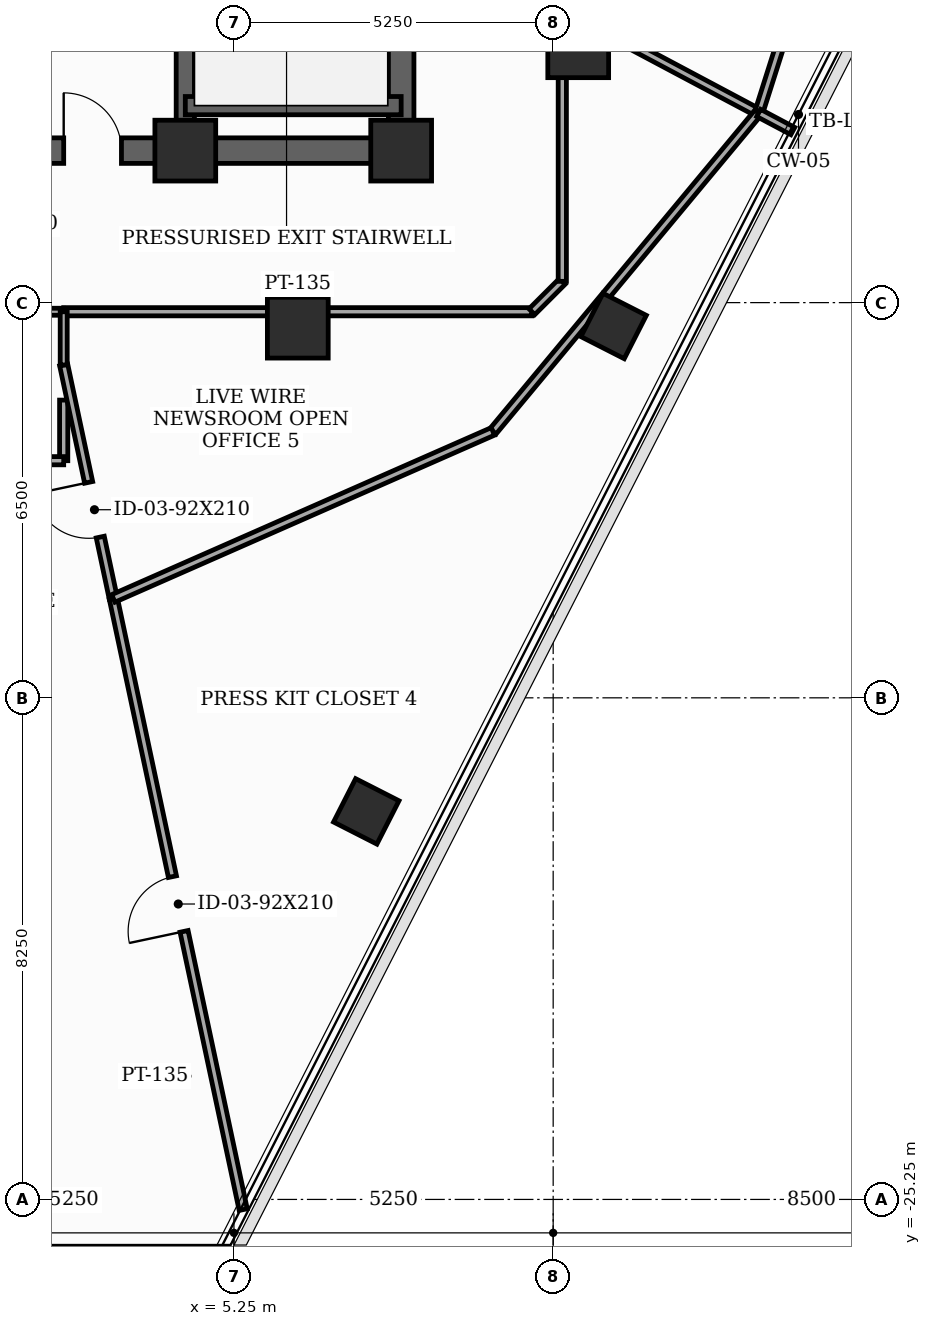
"""IFC4 building model, lengths in metres.
Left out: names, types, materials, properties, quantities, classifications, styles, units other than length and angle.
Written with IfcOpenShell. Run it as: python <this file> out.ifc"""

import sys

from ifc_helpers import new_model, si_unit, direction, frame, frame_2d, origin, origin_2d, place, context, subcontext, project, spatial, rectangle, extrude, element, fill, save


model = new_model("IFC4")
c1 = context("Model", 3, precision=1e-05, world=origin(), true_north=direction((0.0, 1.0)))
c2 = subcontext(c1, "Body", "Model", "MODEL_VIEW")
j1 = project(units=[si_unit("LENGTHUNIT", "METRE"), si_unit("PLANEANGLEUNIT", "RADIAN")], contexts=[c1])
p1 = place(None, origin())
s1 = spatial("IfcSite", under=j1, at=p1, CompositionType="ELEMENT")
p2 = place(p1, origin())
s2 = spatial("IfcBuilding", under=s1, at=p2, CompositionType="ELEMENT")
p3 = place(p2, frame((0.0, 0.0, 263.3)))
s3 = spatial("IfcBuildingStorey", under=s2, at=p3, CompositionType="ELEMENT", Elevation=263.3)
for number, where, z_axis, x_axis in (
    (1, (4.45, -8.0, 0.0), (0.0, 0.0, 1.0), (1.0, 0.0, 0.0)),
    (2, (8.0, -8.0, 0.0), (0.0, 0.0, 1.0), (1.0, 0.0, 0.0)),
    (3, (6.3, -10.912, 0.0), (0.0, 0.0, 1.0), (1.0, 0.0, 0.0)),
    (4, (10.912, -6.3, 0.0), (0.0, 0.0, 1.0), (1.0, 0.0, 0.0)),
):
    element("IfcColumn", number, at=place(p3, frame(where, z_axis=z_axis, x_axis=x_axis)), inside=s3, PredefinedType="COLUMN", context=c2, shape_type="SweptSolid", body=[
        extrude(rectangle(XDim=1.0, YDim=1.0, at=origin_2d()), origin(), (0.0, 0.0, 1.0), 3.7),
    ])
for number, where, z_axis, x_axis in (
    (5, (7.426, -18.868, 0.0), (0.0, 0.0, 1.0), (0.454, 0.891, 0.0)),
    (6, (11.494, -10.885, 0.0), (0.0, 0.0, 1.0), (0.454, 0.891, 0.0)),
):
    element("IfcColumn", number, at=place(p3, frame(where, z_axis=z_axis, x_axis=x_axis)), inside=s3, PredefinedType="COLUMN", context=c2, shape_type="SweptSolid", body=[
        extrude(rectangle(XDim=0.8, YDim=0.8, at=origin_2d()), origin(), (0.0, 0.0, 1.0), 3.7),
    ])
p4 = place(p3, frame((8.0, -8.0, 0.0), z_axis=(0.0, 0.0, 1.0), x_axis=(0.0, 1.0, 0.0)))
e7 = element("IfcWall", 7, at=p4, inside=s3, PredefinedType="SHEAR", context=c2, shape_type="SweptSolid", body=[
    extrude(rectangle(XDim=16.0, YDim=0.42, at=frame_2d((8.0, 0.0))), origin(), (0.0, 0.0, 1.0), 3.5),
])
p5 = place(p4, frame((9.6, 0.0, 0.0)))
e8 = element("IfcOpeningElement", 8, at=p5, cuts=e7, PredefinedType="OPENING", context=c2, shape_type="SweptSolid", body=[
    extrude(rectangle(XDim=1.05, YDim=2.15, at=frame_2d((0.525, 1.075))), frame((0.0, 0.22, 0.0), z_axis=(0.0, -1.0, 0.0), x_axis=(1.0, 0.0, 0.0)), (0.0, 0.0, 1.0), 0.44),
])
p6 = place(p4, frame((14.469, 0.0, 0.0)))
e9 = element("IfcOpeningElement", 9, at=p6, cuts=e7, PredefinedType="OPENING", context=c2, shape_type="SweptSolid", body=[
    extrude(rectangle(XDim=0.85, YDim=2.02, at=frame_2d((0.425, 1.01))), frame((0.0, 0.22, 0.0), z_axis=(0.0, -1.0, 0.0), x_axis=(1.0, 0.0, 0.0)), (0.0, 0.0, 1.0), 0.44),
])
p7 = place(p3, frame((-8.0, -8.0, 0.0), z_axis=(0.0, 0.0, 1.0), x_axis=(1.0, 0.0, 0.0)))
e10 = element("IfcWall", 10, at=p7, inside=s3, PredefinedType="SHEAR", context=c2, shape_type="SweptSolid", body=[
    extrude(rectangle(XDim=16.0, YDim=0.42, at=frame_2d((8.0, 0.0))), origin(), (0.0, 0.0, 1.0), 3.5),
])
p8 = place(p7, frame((4.6, 0.0, 0.0)))
e11 = element("IfcOpeningElement", 11, at=p8, cuts=e10, PredefinedType="OPENING", context=c2, shape_type="SweptSolid", body=[
    extrude(rectangle(XDim=0.95, YDim=2.1, at=frame_2d((0.475, 1.05))), frame((0.0, 0.22, 0.0), z_axis=(0.0, -1.0, 0.0), x_axis=(1.0, 0.0, 0.0)), (0.0, 0.0, 1.0), 0.44),
])
p9 = place(p7, frame((7.52, 0.0, 0.0)))
e12 = element("IfcOpeningElement", 12, at=p9, cuts=e10, PredefinedType="OPENING", context=c2, shape_type="SweptSolid", body=[
    extrude(rectangle(XDim=0.95, YDim=2.1, at=frame_2d((0.475, 1.05))), frame((0.0, 0.22, 0.0), z_axis=(0.0, -1.0, 0.0), x_axis=(1.0, 0.0, 0.0)), (0.0, 0.0, 1.0), 0.44),
])
p10 = place(p7, frame((10.45, 0.0, 0.0)))
e13 = element("IfcOpeningElement", 13, at=p10, cuts=e10, PredefinedType="OPENING", context=c2, shape_type="SweptSolid", body=[
    extrude(rectangle(XDim=0.95, YDim=2.1, at=frame_2d((0.475, 1.05))), frame((0.0, 0.22, 0.0), z_axis=(0.0, -1.0, 0.0), x_axis=(1.0, 0.0, 0.0)), (0.0, 0.0, 1.0), 0.44),
])
p11 = place(p3, frame((4.45, -7.79, 0.0), z_axis=(0.0, 0.0, 1.0), x_axis=(0.0, 1.0, 0.0)))
e14 = element("IfcWall", 14, at=p11, inside=s3, PredefinedType="SHEAR", context=c2, shape_type="SweptSolid", body=[
    extrude(rectangle(XDim=15.58, YDim=0.3, at=frame_2d((7.79, 0.0))), origin(), (0.0, 0.0, 1.0), 3.5),
])
p12 = place(p3, frame((4.45, -7.26, 0.0), z_axis=(0.0, 0.0, 1.0), x_axis=(1.0, 0.0, 0.0)))
e15 = element("IfcWall", 15, at=p12, inside=s3, PredefinedType="SHEAR", context=c2, shape_type="SweptSolid", body=[
    extrude(rectangle(XDim=3.55, YDim=0.3, at=frame_2d((1.775, 0.0))), origin(), (0.0, 0.0, 1.0), 3.5),
])
p13 = place(p3, frame((0.0, -10.65, 0.0), z_axis=(0.0, 0.0, 1.0), x_axis=(1.0, 0.0, 0.0)))
e16 = element("IfcWall", 16, at=p13, inside=s3, PredefinedType="PARTITIONING", context=c2, shape_type="SweptSolid", body=[
    extrude(rectangle(XDim=2.45, YDim=0.115, at=frame_2d((1.225, 0.0))), origin(), (0.0, 0.0, 1.0), 3.5),
])
p14 = place(p13, frame((0.765, 0.0, 0.0)))
e17 = element("IfcOpeningElement", 17, at=p14, cuts=e16, PredefinedType="OPENING", context=c2, shape_type="SweptSolid", body=[
    extrude(rectangle(XDim=0.92, YDim=2.1, at=frame_2d((0.46, 1.05))), frame((0.0, 0.067, 0.0), z_axis=(0.0, -1.0, 0.0), x_axis=(1.0, 0.0, 0.0)), (0.0, 0.0, 1.0), 0.135),
])
p15 = place(p3, frame((2.45, -10.65, 0.0), z_axis=(0.0, 0.0, 1.0), x_axis=(1.0, 0.0, 0.0)))
e18 = element("IfcWall", 18, at=p15, inside=s3, PredefinedType="PARTITIONING", context=c2, shape_type="SweptSolid", body=[
    extrude(rectangle(XDim=7.7, YDim=0.135, at=frame_2d((3.85, 0.0))), origin(), (0.0, 0.0, 1.0), 2.885),
])
p16 = place(p3, frame((10.15, -10.65, 0.0), z_axis=(0.0, 0.0, 1.0), x_axis=(0.707106781187, 0.707106781187, 0.0)))
e19 = element("IfcWall", 19, at=p16, inside=s3, PredefinedType="PARTITIONING", context=c2, shape_type="SweptSolid", body=[
    extrude(rectangle(XDim=0.707, YDim=0.135, at=frame_2d((0.354, 0.0))), origin(), (0.0, 0.0, 1.0), 3.5),
])
p17 = place(p3, frame((10.65, -10.15, 0.0), z_axis=(0.0, 0.0, 1.0), x_axis=(0.0, 1.0, 0.0)))
e20 = element("IfcWall", 20, at=p17, inside=s3, PredefinedType="PARTITIONING", context=c2, shape_type="SweptSolid", body=[
    extrude(rectangle(XDim=4.487, YDim=0.135, at=frame_2d((2.243, 0.0))), origin(), (0.0, 0.0, 1.0), 2.885),
])
p18 = place(p3, frame((10.65, -5.663, 0.0), z_axis=(0.0, 0.0, 1.0), x_axis=(0.882982204984, -0.469406461057, 0.0)))
e21 = element("IfcWall", 21, at=p18, inside=s3, PredefinedType="PARTITIONING", context=c2, shape_type="SweptSolid", body=[
    extrude(rectangle(XDim=3.647, YDim=0.135, at=frame_2d((1.823, 0.0))), origin(), (0.0, 0.0, 1.0), 2.885),
])
p19 = place(p3, frame((13.887, -7.354, 0.0), z_axis=(0.0, 0.0, 1.0), x_axis=(0.302867480059, 0.953032680197, 0.0)))
e22 = element("IfcWall", 22, at=p19, inside=s3, PredefinedType="PARTITIONING", context=c2, shape_type="SweptSolid", body=[
    extrude(rectangle(XDim=6.055, YDim=0.135, at=frame_2d((3.028, 0.0))), origin(), (0.0, 0.0, 1.0), 3.035),
])
p20 = place(p3, frame((2.45, -12.103, 0.0), z_axis=(0.0, 0.0, 1.0), x_axis=(0.0, -1.0, 0.0)))
e23 = element("IfcWall", 23, at=p20, inside=s3, PredefinedType="PARTITIONING", context=c2, shape_type="SweptSolid", body=[
    extrude(rectangle(XDim=0.997, YDim=0.135, at=frame_2d((0.499, 0.0))), origin(), (0.0, 0.0, 1.0), 2.885),
])
p21 = place(p3, frame((2.45, -13.1, 0.0), z_axis=(0.0, 0.0, 1.0), x_axis=(-1.0, 0.0, 0.0)))
e24 = element("IfcWall", 24, at=p21, inside=s3, PredefinedType="PARTITIONING", context=c2, shape_type="SweptSolid", body=[
    extrude(rectangle(XDim=2.45, YDim=0.135, at=frame_2d((1.225, 0.0))), origin(), (0.0, 0.0, 1.0), 3.5),
])
p22 = place(p3, frame((5.402, -25.417, 0.0), z_axis=(0.0, 0.0, 1.0), x_axis=(-0.207847958891, 0.978161145203, 0.0)))
e25 = element("IfcWall", 25, at=p22, inside=s3, PredefinedType="PARTITIONING", context=c2, shape_type="SweptSolid", body=[
    extrude(rectangle(XDim=10.277, YDim=0.135, at=frame_2d((5.138, 0.0))), origin(), (0.0, 0.0, 1.0), 3.035),
])
p23 = place(p22, frame((4.678, 0.0, 0.0)))
e26 = element("IfcOpeningElement", 26, at=p23, cuts=e25, PredefinedType="OPENING", context=c2, shape_type="SweptSolid", body=[
    extrude(rectangle(XDim=0.92, YDim=2.1, at=frame_2d((0.46, 1.05))), frame((0.0, 0.077, 0.0), z_axis=(0.0, -1.0, 0.0), x_axis=(1.0, 0.0, 0.0)), (0.0, 0.0, 1.0), 0.155),
])
p24 = place(p3, frame((3.266, -15.365, 0.0), z_axis=(0.0, 0.0, 1.0), x_axis=(-0.207944308429, 0.978140667078, 0.0)))
e27 = element("IfcWall", 27, at=p24, inside=s3, PredefinedType="PARTITIONING", context=c2, shape_type="SweptSolid", body=[
    extrude(rectangle(XDim=3.925, YDim=0.135, at=frame_2d((1.962, 0.0))), origin(), (0.0, 0.0, 1.0), 2.885),
])
p25 = place(p24, frame((1.031, 0.0, 0.0)))
e28 = element("IfcOpeningElement", 28, at=p25, cuts=e27, PredefinedType="OPENING", context=c2, shape_type="SweptSolid", body=[
    extrude(rectangle(XDim=0.92, YDim=2.1, at=frame_2d((0.46, 1.05))), frame((0.0, 0.077, 0.0), z_axis=(0.0, -1.0, 0.0), x_axis=(1.0, 0.0, 0.0)), (0.0, 0.0, 1.0), 0.155),
])
p26 = place(p3, frame((2.45, -11.526, 0.0), z_axis=(0.0, 0.0, 1.0), x_axis=(0.0, 1.0, 0.0)))
e29 = element("IfcWall", 29, at=p26, inside=s3, PredefinedType="PARTITIONING", context=c2, shape_type="SweptSolid", body=[
    extrude(rectangle(XDim=0.876, YDim=0.115, at=frame_2d((0.438, 0.0))), origin(), (0.0, 0.0, 1.0), 3.5),
])
p27 = place(p3, frame((13.87, -7.375, 0.0), z_axis=(0.0, 0.0, 1.0), x_axis=(-0.63949044568, -0.768799043888, 0.0)))
e30 = element("IfcWall", 30, at=p27, inside=s3, PredefinedType="PARTITIONING", context=c2, shape_type="SweptSolid", body=[
    extrude(rectangle(XDim=6.82, YDim=0.135, at=frame_2d((3.41, 0.0))), origin(), (0.0, 0.0, 1.0), 3.035),
])
p28 = place(p3, frame((9.509, -12.618, 0.0), z_axis=(0.0, 0.0, 1.0), x_axis=(-0.915305003879, -0.402761405641, 0.0)))
e31 = element("IfcWall", 31, at=p28, inside=s3, PredefinedType="PARTITIONING", context=c2, shape_type="SweptSolid", body=[
    extrude(rectangle(XDim=6.821, YDim=0.135, at=frame_2d((3.41, 0.0))), origin(), (0.0, 0.0, 1.0), 3.035),
])
p29 = place(p3, frame((14.441, -7.678, 0.0), z_axis=(0.0, 0.0, 1.0), x_axis=(-0.883423592085, 0.468575241501, 0.0)))
e32 = element("IfcWall", 32, at=p29, inside=s3, PredefinedType="PARTITIONING", context=c2, shape_type="SweptSolid", body=[
    extrude(rectangle(XDim=0.636, YDim=0.135, at=frame_2d((0.318, 0.0))), origin(), (0.0, 0.0, 1.0), 3.5),
])
p30 = place(p10, origin())
e33 = element("IfcDoor", 33, at=p30, inside=s3, OperationType="SINGLE_SWING_LEFT", PredefinedType="DOOR", context=c2, shape_type="SweptSolid", body=[
    extrude(rectangle(XDim=0.95, YDim=2.1, at=frame_2d((0.475, 1.05))), frame((0.0, 0.025, 0.0), z_axis=(0.0, -1.0, 0.0), x_axis=(1.0, 0.0, 0.0)), (0.0, 0.0, 1.0), 0.05),
])
fill(e13, e33)
p31 = place(p23, origin())
e34 = element("IfcDoor", 34, at=p31, inside=s3, OperationType="SINGLE_SWING_LEFT", PredefinedType="DOOR", context=c2, shape_type="SweptSolid", body=[
    extrude(rectangle(XDim=0.92, YDim=2.1, at=frame_2d((0.46, 1.05))), frame((0.0, 0.025, 0.0), z_axis=(0.0, -1.0, 0.0), x_axis=(1.0, 0.0, 0.0)), (0.0, 0.0, 1.0), 0.05),
])
fill(e26, e34)
p32 = place(p25, origin())
e35 = element("IfcDoor", 35, at=p32, inside=s3, OperationType="SINGLE_SWING_RIGHT", PredefinedType="DOOR", context=c2, shape_type="SweptSolid", body=[
    extrude(rectangle(XDim=0.92, YDim=2.1, at=frame_2d((0.46, 1.05))), frame((0.0, 0.025, 0.0), z_axis=(0.0, -1.0, 0.0), x_axis=(1.0, 0.0, 0.0)), (0.0, 0.0, 1.0), 0.05),
])
fill(e28, e35)
save(model, sys.argv[1])
